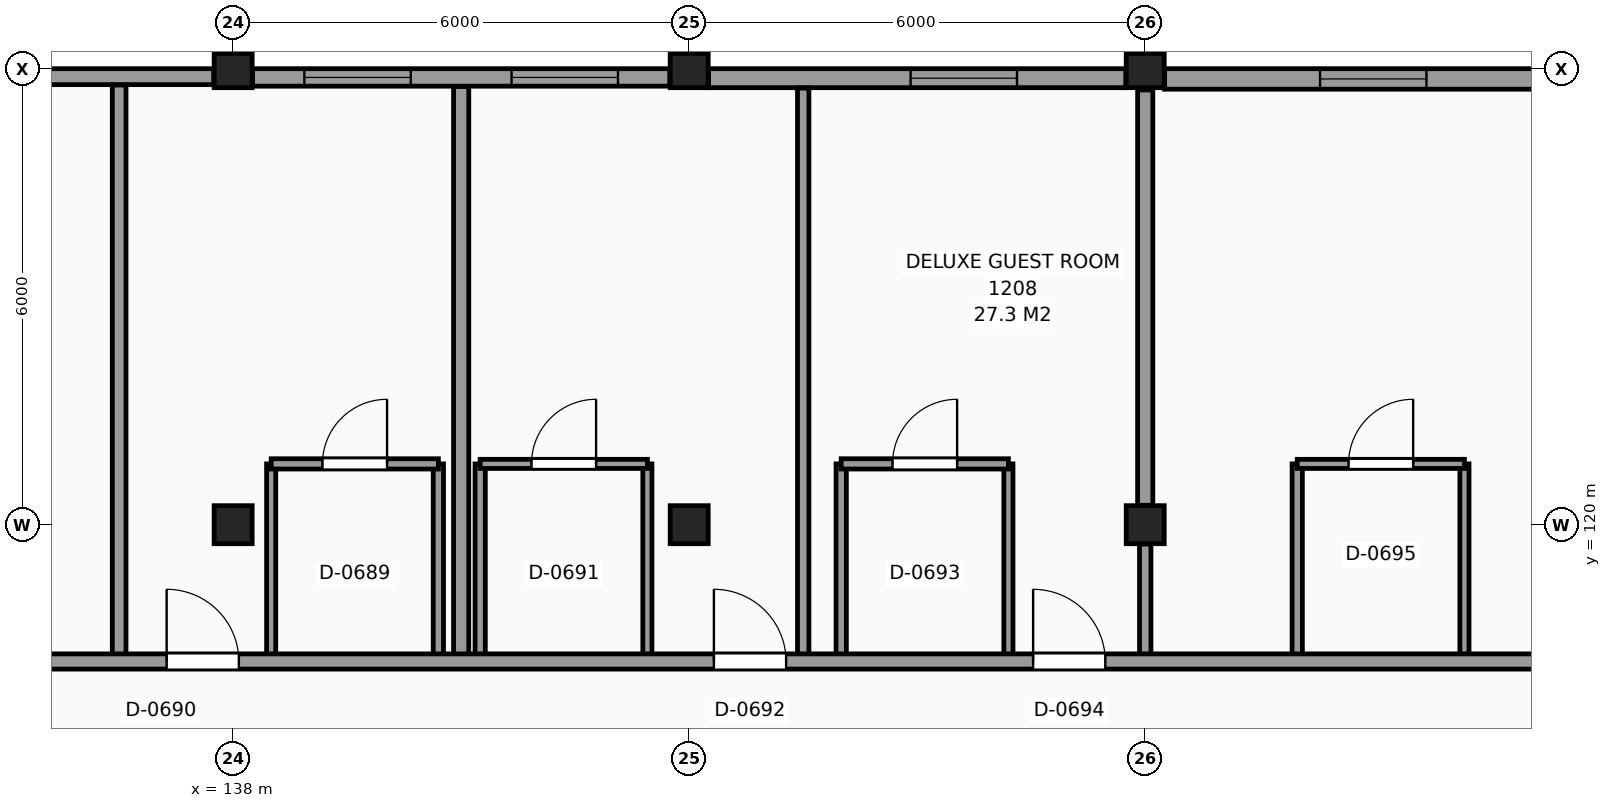
"""IFC4 building model, lengths in metres.
Left out: names, types, materials, properties, quantities, classifications, styles, units other than length and angle.
Written with IfcOpenShell. Run it as: python <this file> out.ifc"""

import sys

from ifc_helpers import new_model, si_unit, direction, frame, frame_2d, origin, origin_2d, place, context, subcontext, project, spatial, rectangle, extrude, element, fill, save


model = new_model("IFC4")
c1 = context("Model", 3, precision=1e-05, world=origin(), true_north=direction((0.0, 1.0)))
c2 = subcontext(c1, "Body", "Model", "MODEL_VIEW")
j1 = project(units=[si_unit("LENGTHUNIT", "METRE"), si_unit("PLANEANGLEUNIT", "RADIAN")], contexts=[c1])
p1 = place(None, origin())
s1 = spatial("IfcSite", under=j1, at=p1, CompositionType="ELEMENT")
p2 = place(p1, origin())
s2 = spatial("IfcBuilding", under=s1, at=p2, CompositionType="ELEMENT")
p3 = place(p2, frame((0.0, 0.0, 48.0)))
s3 = spatial("IfcBuildingStorey", under=s2, at=p3, CompositionType="ELEMENT", Elevation=48.0)
for number, where, z_axis, x_axis in (
    (1, (138.0, 120.0, 0.0), (0.0, 0.0, 1.0), (1.0, 0.0, 0.0)),
    (2, (138.0, 126.0, 0.0), (0.0, 0.0, 1.0), (1.0, 0.0, 0.0)),
    (3, (144.0, 120.0, 0.0), (0.0, 0.0, 1.0), (1.0, 0.0, 0.0)),
    (4, (144.0, 126.0, 0.0), (0.0, 0.0, 1.0), (1.0, 0.0, 0.0)),
    (5, (150.0, 120.0, 0.0), (0.0, 0.0, 1.0), (1.0, 0.0, 0.0)),
    (6, (150.0, 126.0, 0.0), (0.0, 0.0, 1.0), (1.0, 0.0, 0.0)),
):
    element("IfcColumn", number, at=place(p3, frame(where, z_axis=z_axis, x_axis=x_axis)), inside=s3, PredefinedType="COLUMN", context=c2, shape_type="SweptSolid", body=[
        extrude(rectangle(XDim=0.5, YDim=0.5, at=origin_2d()), origin(), (0.0, 0.0, 1.0), 3.3),
    ])
p4 = place(p3, frame((155.745, 125.865, 0.0), z_axis=(0.0, 0.0, 1.0), x_axis=(-1.0, 0.0, 0.0)))
e7 = element("IfcWall", 7, at=p4, inside=s3, PredefinedType="SOLIDWALL", context=c2, shape_type="SweptSolid", body=[
    extrude(rectangle(XDim=5.49, YDim=0.27, at=frame_2d((2.745, 0.0))), origin(), (0.0, 0.0, 1.0), 2.4),
])
p5 = place(p4, frame((2.045, 0.0, 0.8)))
e8 = element("IfcOpeningElement", 8, at=p5, cuts=e7, PredefinedType="OPENING", context=c2, shape_type="SweptSolid", body=[
    extrude(rectangle(XDim=1.4, YDim=1.4, at=frame_2d((0.7, 0.7))), frame((0.0, 0.145, 0.0), z_axis=(0.0, -1.0, 0.0), x_axis=(1.0, 0.0, 0.0)), (0.0, 0.0, 1.0), 0.29),
])
p6 = place(p3, frame((149.745, 125.875, 0.0), z_axis=(0.0, 0.0, 1.0), x_axis=(-1.0, 0.0, 0.0)))
e9 = element("IfcWall", 9, at=p6, inside=s3, PredefinedType="SOLIDWALL", context=c2, shape_type="SweptSolid", body=[
    extrude(rectangle(XDim=5.49, YDim=0.25, at=frame_2d((2.745, 0.0))), origin(), (0.0, 0.0, 1.0), 2.4),
])
p7 = place(p6, frame((1.432, 0.0, 0.8)))
e10 = element("IfcOpeningElement", 10, at=p7, cuts=e9, PredefinedType="OPENING", context=c2, shape_type="SweptSolid", body=[
    extrude(rectangle(XDim=1.4, YDim=1.4, at=frame_2d((0.7, 0.7))), frame((0.0, 0.135, 0.0), z_axis=(0.0, -1.0, 0.0), x_axis=(1.0, 0.0, 0.0)), (0.0, 0.0, 1.0), 0.27),
])
p8 = place(p3, frame((143.745, 125.885, 0.0), z_axis=(0.0, 0.0, 1.0), x_axis=(-1.0, 0.0, 0.0)))
e11 = element("IfcWall", 11, at=p8, inside=s3, PredefinedType="SOLIDWALL", context=c2, shape_type="SweptSolid", body=[
    extrude(rectangle(XDim=5.49, YDim=0.23, at=frame_2d((2.745, 0.0))), origin(), (0.0, 0.0, 1.0), 2.4),
])
p9 = place(p8, frame((3.408, 0.0, 0.8)))
e12 = element("IfcOpeningElement", 12, at=p9, cuts=e11, PredefinedType="OPENING", context=c2, shape_type="SweptSolid", body=[
    extrude(rectangle(XDim=1.4, YDim=1.4, at=frame_2d((0.7, 0.7))), frame((0.0, 0.125, 0.0), z_axis=(0.0, -1.0, 0.0), x_axis=(1.0, 0.0, 0.0)), (0.0, 0.0, 1.0), 0.25),
])
p10 = place(p8, frame((0.682, 0.0, 0.8)))
e13 = element("IfcOpeningElement", 13, at=p10, cuts=e11, PredefinedType="OPENING", context=c2, shape_type="SweptSolid", body=[
    extrude(rectangle(XDim=1.4, YDim=1.4, at=frame_2d((0.7, 0.7))), frame((0.0, 0.125, 0.0), z_axis=(0.0, -1.0, 0.0), x_axis=(1.0, 0.0, 0.0)), (0.0, 0.0, 1.0), 0.25),
])
p11 = place(p3, frame((137.745, 125.895, 0.0), z_axis=(0.0, 0.0, 1.0), x_axis=(-1.0, 0.0, 0.0)))
e14 = element("IfcWall", 14, at=p11, inside=s3, PredefinedType="SOLIDWALL", context=c2, shape_type="SweptSolid", body=[
    extrude(rectangle(XDim=5.49, YDim=0.21, at=frame_2d((2.745, 0.0))), origin(), (0.0, 0.0, 1.0), 2.4),
])
p12 = place(p3, frame((136.5, 118.2, 0.0), z_axis=(0.0, 0.0, 1.0), x_axis=(0.0, 1.0, 0.0)))
e15 = element("IfcWall", 15, at=p12, inside=s3, PredefinedType="PARTITIONING", context=c2, shape_type="SweptSolid", body=[
    extrude(rectangle(XDim=7.585, YDim=0.18, at=frame_2d((3.792, 0.0))), origin(), (0.0, 0.0, 1.0), 3.05),
])
p13 = place(p3, frame((138.5, 118.2, 0.0), z_axis=(0.0, 0.0, 1.0), x_axis=(0.0, 1.0, 0.0)))
e16 = element("IfcWall", 16, at=p13, inside=s3, PredefinedType="PARTITIONING", context=c2, shape_type="SweptSolid", body=[
    extrude(rectangle(XDim=2.6, YDim=0.12, at=frame_2d((1.3, 0.0))), origin(), (0.0, 0.0, 1.0), 3.05),
])
p14 = place(p3, frame((140.7, 118.2, 0.0), z_axis=(0.0, 0.0, 1.0), x_axis=(0.0, 1.0, 0.0)))
e17 = element("IfcWall", 17, at=p14, inside=s3, PredefinedType="PARTITIONING", context=c2, shape_type="SweptSolid", body=[
    extrude(rectangle(XDim=2.6, YDim=0.135, at=frame_2d((1.3, 0.0))), origin(), (0.0, 0.0, 1.0), 3.05),
])
p15 = place(p3, frame((141.0, 118.2, 0.0), z_axis=(0.0, 0.0, 1.0), x_axis=(0.0, 1.0, 0.0)))
e18 = element("IfcWall", 18, at=p15, inside=s3, PredefinedType="PARTITIONING", context=c2, shape_type="SweptSolid", body=[
    extrude(rectangle(XDim=7.565, YDim=0.2, at=frame_2d((3.782, 0.0))), origin(), (0.0, 0.0, 1.0), 3.05),
])
p16 = place(p3, frame((141.25, 118.2, 0.0), z_axis=(0.0, 0.0, 1.0), x_axis=(0.0, 1.0, 0.0)))
e19 = element("IfcWall", 19, at=p16, inside=s3, PredefinedType="PARTITIONING", context=c2, shape_type="SweptSolid", body=[
    extrude(rectangle(XDim=2.6, YDim=0.135, at=frame_2d((1.3, 0.0))), origin(), (0.0, 0.0, 1.0), 3.05),
])
p17 = place(p3, frame((143.45, 118.2, 0.0), z_axis=(0.0, 0.0, 1.0), x_axis=(0.0, 1.0, 0.0)))
e20 = element("IfcWall", 20, at=p17, inside=s3, PredefinedType="PARTITIONING", context=c2, shape_type="SweptSolid", body=[
    extrude(rectangle(XDim=2.6, YDim=0.12, at=frame_2d((1.3, 0.0))), origin(), (0.0, 0.0, 1.0), 3.05),
])
p18 = place(p3, frame((145.5, 118.2, 0.0), z_axis=(0.0, 0.0, 1.0), x_axis=(0.0, 1.0, 0.0)))
e21 = element("IfcWall", 21, at=p18, inside=s3, PredefinedType="PARTITIONING", context=c2, shape_type="SweptSolid", body=[
    extrude(rectangle(XDim=7.545, YDim=0.15, at=frame_2d((3.772, 0.0))), origin(), (0.0, 0.0, 1.0), 3.05),
])
p19 = place(p3, frame((146.0, 118.2, 0.0), z_axis=(0.0, 0.0, 1.0), x_axis=(0.0, 1.0, 0.0)))
e22 = element("IfcWall", 22, at=p19, inside=s3, PredefinedType="PARTITIONING", context=c2, shape_type="SweptSolid", body=[
    extrude(rectangle(XDim=2.6, YDim=0.135, at=frame_2d((1.3, 0.0))), origin(), (0.0, 0.0, 1.0), 3.05),
])
p20 = place(p3, frame((148.2, 118.2, 0.0), z_axis=(0.0, 0.0, 1.0), x_axis=(0.0, 1.0, 0.0)))
e23 = element("IfcWall", 23, at=p20, inside=s3, PredefinedType="PARTITIONING", context=c2, shape_type="SweptSolid", body=[
    extrude(rectangle(XDim=2.6, YDim=0.12, at=frame_2d((1.3, 0.0))), origin(), (0.0, 0.0, 1.0), 3.05),
])
p21 = place(p3, frame((150.0, 118.2, 0.0), z_axis=(0.0, 0.0, 1.0), x_axis=(0.0, 1.0, 0.0)))
e24 = element("IfcWall", 24, at=p21, inside=s3, PredefinedType="PARTITIONING", context=c2, shape_type="SweptSolid", body=[
    extrude(rectangle(XDim=1.545, YDim=0.15, at=frame_2d((0.772, 0.0))), origin(), (0.0, 0.0, 1.0), 2.5),
])
p22 = place(p3, frame((150.0, 120.255, 0.0), z_axis=(0.0, 0.0, 1.0), x_axis=(0.0, 1.0, 0.0)))
e25 = element("IfcWall", 25, at=p22, inside=s3, PredefinedType="PARTITIONING", context=c2, shape_type="SweptSolid", body=[
    extrude(rectangle(XDim=5.465, YDim=0.2, at=frame_2d((2.732, 0.0))), origin(), (0.0, 0.0, 1.0), 2.55),
])
p23 = place(p3, frame((152.0, 118.2, 0.0), z_axis=(0.0, 0.0, 1.0), x_axis=(0.0, 1.0, 0.0)))
e26 = element("IfcWall", 26, at=p23, inside=s3, PredefinedType="PARTITIONING", context=c2, shape_type="SweptSolid", body=[
    extrude(rectangle(XDim=2.6, YDim=0.135, at=frame_2d((1.3, 0.0))), origin(), (0.0, 0.0, 1.0), 3.05),
])
p24 = place(p3, frame((154.2, 118.2, 0.0), z_axis=(0.0, 0.0, 1.0), x_axis=(0.0, 1.0, 0.0)))
e27 = element("IfcWall", 27, at=p24, inside=s3, PredefinedType="PARTITIONING", context=c2, shape_type="SweptSolid", body=[
    extrude(rectangle(XDim=2.6, YDim=0.12, at=frame_2d((1.3, 0.0))), origin(), (0.0, 0.0, 1.0), 3.05),
])
p25 = place(p3, frame((102.235, 118.2, 0.0), z_axis=(0.0, 0.0, 1.0), x_axis=(1.0, 0.0, 0.0)))
e28 = element("IfcWall", 28, at=p25, inside=s3, PredefinedType="PARTITIONING", context=c2, shape_type="SweptSolid", body=[
    extrude(rectangle(XDim=74.265, YDim=0.2, at=frame_2d((37.132, 0.0))), origin(), (0.0, 0.0, 1.0), 3.05),
])
p26 = place(p25, frame((0.49, 0.0, 0.0)))
e29 = element("IfcOpeningElement", 29, at=p26, cuts=e28, PredefinedType="OPENING", context=c2, shape_type="SweptSolid", body=[
    extrude(rectangle(XDim=0.95, YDim=2.1, at=frame_2d((0.475, 1.05))), frame((0.0, 0.11, 0.0), z_axis=(0.0, -1.0, 0.0), x_axis=(1.0, 0.0, 0.0)), (0.0, 0.0, 1.0), 0.22),
])
p27 = place(p25, frame((4.89, 0.0, 0.0)))
e30 = element("IfcOpeningElement", 30, at=p27, cuts=e28, PredefinedType="OPENING", context=c2, shape_type="SweptSolid", body=[
    extrude(rectangle(XDim=0.95, YDim=2.1, at=frame_2d((0.475, 1.05))), frame((0.0, 0.11, 0.0), z_axis=(0.0, -1.0, 0.0), x_axis=(1.0, 0.0, 0.0)), (0.0, 0.0, 1.0), 0.22),
])
p28 = place(p25, frame((12.09, 0.0, 0.0)))
e31 = element("IfcOpeningElement", 31, at=p28, cuts=e28, PredefinedType="OPENING", context=c2, shape_type="SweptSolid", body=[
    extrude(rectangle(XDim=0.95, YDim=2.1, at=frame_2d((0.475, 1.05))), frame((0.0, 0.11, 0.0), z_axis=(0.0, -1.0, 0.0), x_axis=(1.0, 0.0, 0.0)), (0.0, 0.0, 1.0), 0.22),
])
p29 = place(p25, frame((20.34, 0.0, 0.0)))
e32 = element("IfcOpeningElement", 32, at=p29, cuts=e28, PredefinedType="OPENING", context=c2, shape_type="SweptSolid", body=[
    extrude(rectangle(XDim=0.95, YDim=2.1, at=frame_2d((0.475, 1.05))), frame((0.0, 0.11, 0.0), z_axis=(0.0, -1.0, 0.0), x_axis=(1.0, 0.0, 0.0)), (0.0, 0.0, 1.0), 0.22),
])
p30 = place(p25, frame((32.34, 0.0, 0.0)))
e33 = element("IfcOpeningElement", 33, at=p30, cuts=e28, PredefinedType="OPENING", context=c2, shape_type="SweptSolid", body=[
    extrude(rectangle(XDim=0.95, YDim=2.1, at=frame_2d((0.475, 1.05))), frame((0.0, 0.11, 0.0), z_axis=(0.0, -1.0, 0.0), x_axis=(1.0, 0.0, 0.0)), (0.0, 0.0, 1.0), 0.22),
])
p31 = place(p25, frame((34.89, 0.0, 0.0)))
e34 = element("IfcOpeningElement", 34, at=p31, cuts=e28, PredefinedType="OPENING", context=c2, shape_type="SweptSolid", body=[
    extrude(rectangle(XDim=0.95, YDim=2.1, at=frame_2d((0.475, 1.05))), frame((0.0, 0.11, 0.0), z_axis=(0.0, -1.0, 0.0), x_axis=(1.0, 0.0, 0.0)), (0.0, 0.0, 1.0), 0.22),
])
p32 = place(p25, frame((42.09, 0.0, 0.0)))
e35 = element("IfcOpeningElement", 35, at=p32, cuts=e28, PredefinedType="OPENING", context=c2, shape_type="SweptSolid", body=[
    extrude(rectangle(XDim=0.95, YDim=2.1, at=frame_2d((0.475, 1.05))), frame((0.0, 0.11, 0.0), z_axis=(0.0, -1.0, 0.0), x_axis=(1.0, 0.0, 0.0)), (0.0, 0.0, 1.0), 0.22),
])
p33 = place(p25, frame((46.29, 0.0, 0.0)))
e36 = element("IfcOpeningElement", 36, at=p33, cuts=e28, PredefinedType="OPENING", context=c2, shape_type="SweptSolid", body=[
    extrude(rectangle(XDim=0.95, YDim=2.1, at=frame_2d((0.475, 1.05))), frame((0.0, 0.11, 0.0), z_axis=(0.0, -1.0, 0.0), x_axis=(1.0, 0.0, 0.0)), (0.0, 0.0, 1.0), 0.22),
])
p34 = place(p25, frame((55.59, 0.0, 0.0)))
e37 = element("IfcOpeningElement", 37, at=p34, cuts=e28, PredefinedType="OPENING", context=c2, shape_type="SweptSolid", body=[
    extrude(rectangle(XDim=0.95, YDim=2.1, at=frame_2d((0.475, 1.05))), frame((0.0, 0.11, 0.0), z_axis=(0.0, -1.0, 0.0), x_axis=(1.0, 0.0, 0.0)), (0.0, 0.0, 1.0), 0.22),
])
p35 = place(p25, frame((60.09, 0.0, 0.0)))
e38 = element("IfcOpeningElement", 38, at=p35, cuts=e28, PredefinedType="OPENING", context=c2, shape_type="SweptSolid", body=[
    extrude(rectangle(XDim=0.95, YDim=2.1, at=frame_2d((0.475, 1.05))), frame((0.0, 0.11, 0.0), z_axis=(0.0, -1.0, 0.0), x_axis=(1.0, 0.0, 0.0)), (0.0, 0.0, 1.0), 0.22),
])
p36 = place(p25, frame((64.29, 0.0, 0.0)))
e39 = element("IfcOpeningElement", 39, at=p36, cuts=e28, PredefinedType="OPENING", context=c2, shape_type="SweptSolid", body=[
    extrude(rectangle(XDim=0.95, YDim=2.1, at=frame_2d((0.475, 1.05))), frame((0.0, 0.11, 0.0), z_axis=(0.0, -1.0, 0.0), x_axis=(1.0, 0.0, 0.0)), (0.0, 0.0, 1.0), 0.22),
])
p37 = place(p25, frame((68.24, 0.0, 0.0)))
e40 = element("IfcOpeningElement", 40, at=p37, cuts=e28, PredefinedType="OPENING", context=c2, shape_type="SweptSolid", body=[
    extrude(rectangle(XDim=0.95, YDim=2.1, at=frame_2d((0.475, 1.05))), frame((0.0, 0.11, 0.0), z_axis=(0.0, -1.0, 0.0), x_axis=(1.0, 0.0, 0.0)), (0.0, 0.0, 1.0), 0.22),
])
p38 = place(p3, frame((138.5, 120.8, 0.0), z_axis=(0.0, 0.0, 1.0), x_axis=(1.0, 0.0, 0.0)))
e41 = element("IfcWall", 41, at=p38, inside=s3, PredefinedType="PARTITIONING", context=c2, shape_type="SweptSolid", body=[
    extrude(rectangle(XDim=2.2, YDim=0.135, at=frame_2d((1.1, 0.0))), origin(), (0.0, 0.0, 1.0), 3.05),
])
p39 = place(p38, frame((0.675, 0.0, 0.0)))
e42 = element("IfcOpeningElement", 42, at=p39, cuts=e41, PredefinedType="OPENING", context=c2, shape_type="SweptSolid", body=[
    extrude(rectangle(XDim=0.85, YDim=2.1, at=frame_2d((0.425, 1.05))), frame((0.0, 0.078, 0.0), z_axis=(0.0, -1.0, 0.0), x_axis=(1.0, 0.0, 0.0)), (0.0, 0.0, 1.0), 0.155),
])
p40 = place(p3, frame((141.25, 120.8, 0.0), z_axis=(0.0, 0.0, 1.0), x_axis=(1.0, 0.0, 0.0)))
e43 = element("IfcWall", 43, at=p40, inside=s3, PredefinedType="PARTITIONING", context=c2, shape_type="SweptSolid", body=[
    extrude(rectangle(XDim=2.2, YDim=0.12, at=frame_2d((1.1, 0.0))), origin(), (0.0, 0.0, 1.0), 3.05),
])
p41 = place(p40, frame((0.675, 0.0, 0.0)))
e44 = element("IfcOpeningElement", 44, at=p41, cuts=e43, PredefinedType="OPENING", context=c2, shape_type="SweptSolid", body=[
    extrude(rectangle(XDim=0.85, YDim=2.1, at=frame_2d((0.425, 1.05))), frame((0.0, 0.07, 0.0), z_axis=(0.0, -1.0, 0.0), x_axis=(1.0, 0.0, 0.0)), (0.0, 0.0, 1.0), 0.14),
])
p42 = place(p3, frame((146.0, 120.8, 0.0), z_axis=(0.0, 0.0, 1.0), x_axis=(1.0, 0.0, 0.0)))
e45 = element("IfcWall", 45, at=p42, inside=s3, PredefinedType="PARTITIONING", context=c2, shape_type="SweptSolid", body=[
    extrude(rectangle(XDim=2.2, YDim=0.135, at=frame_2d((1.1, 0.0))), origin(), (0.0, 0.0, 1.0), 3.05),
])
p43 = place(p42, frame((0.675, 0.0, 0.0)))
e46 = element("IfcOpeningElement", 46, at=p43, cuts=e45, PredefinedType="OPENING", context=c2, shape_type="SweptSolid", body=[
    extrude(rectangle(XDim=0.85, YDim=2.1, at=frame_2d((0.425, 1.05))), frame((0.0, 0.078, 0.0), z_axis=(0.0, -1.0, 0.0), x_axis=(1.0, 0.0, 0.0)), (0.0, 0.0, 1.0), 0.155),
])
p44 = place(p3, frame((152.0, 120.8, 0.0), z_axis=(0.0, 0.0, 1.0), x_axis=(1.0, 0.0, 0.0)))
e47 = element("IfcWall", 47, at=p44, inside=s3, PredefinedType="PARTITIONING", context=c2, shape_type="SweptSolid", body=[
    extrude(rectangle(XDim=2.2, YDim=0.12, at=frame_2d((1.1, 0.0))), origin(), (0.0, 0.0, 1.0), 3.05),
])
p45 = place(p44, frame((0.675, 0.0, 0.0)))
e48 = element("IfcOpeningElement", 48, at=p45, cuts=e47, PredefinedType="OPENING", context=c2, shape_type="SweptSolid", body=[
    extrude(rectangle(XDim=0.85, YDim=2.1, at=frame_2d((0.425, 1.05))), frame((0.0, 0.07, 0.0), z_axis=(0.0, -1.0, 0.0), x_axis=(1.0, 0.0, 0.0)), (0.0, 0.0, 1.0), 0.14),
])
p46 = place(p9, origin())
e49 = element("IfcWindow", 49, at=p46, inside=s3, PartitioningType="SINGLE_PANEL", PredefinedType="WINDOW", context=c2, shape_type="SweptSolid", body=[
    extrude(rectangle(XDim=1.4, YDim=1.4, at=frame_2d((0.7, 0.7))), frame((0.0, 0.03, 0.0), z_axis=(0.0, -1.0, 0.0), x_axis=(1.0, 0.0, 0.0)), (0.0, 0.0, 1.0), 0.06),
])
fill(e12, e49)
p47 = place(p10, origin())
e50 = element("IfcWindow", 50, at=p47, inside=s3, PartitioningType="SINGLE_PANEL", PredefinedType="WINDOW", context=c2, shape_type="SweptSolid", body=[
    extrude(rectangle(XDim=1.4, YDim=1.4, at=frame_2d((0.7, 0.7))), frame((0.0, 0.03, 0.0), z_axis=(0.0, -1.0, 0.0), x_axis=(1.0, 0.0, 0.0)), (0.0, 0.0, 1.0), 0.06),
])
fill(e13, e50)
p48 = place(p7, origin())
e51 = element("IfcWindow", 51, at=p48, inside=s3, PartitioningType="SINGLE_PANEL", PredefinedType="WINDOW", context=c2, shape_type="SweptSolid", body=[
    extrude(rectangle(XDim=1.4, YDim=1.4, at=frame_2d((0.7, 0.7))), frame((0.0, 0.03, 0.0), z_axis=(0.0, -1.0, 0.0), x_axis=(1.0, 0.0, 0.0)), (0.0, 0.0, 1.0), 0.06),
])
fill(e10, e51)
p49 = place(p5, origin())
e52 = element("IfcWindow", 52, at=p49, inside=s3, PartitioningType="SINGLE_PANEL", PredefinedType="WINDOW", context=c2, shape_type="SweptSolid", body=[
    extrude(rectangle(XDim=1.4, YDim=1.4, at=frame_2d((0.7, 0.7))), frame((0.0, 0.03, 0.0), z_axis=(0.0, -1.0, 0.0), x_axis=(1.0, 0.0, 0.0)), (0.0, 0.0, 1.0), 0.06),
])
fill(e8, e52)
p50 = place(p39, origin())
e53 = element("IfcDoor", 53, at=p50, inside=s3, OperationType="SINGLE_SWING_RIGHT", PredefinedType="DOOR", context=c2, shape_type="SweptSolid", body=[
    extrude(rectangle(XDim=0.85, YDim=2.1, at=frame_2d((0.425, 1.05))), frame((0.0, 0.025, 0.0), z_axis=(0.0, -1.0, 0.0), x_axis=(1.0, 0.0, 0.0)), (0.0, 0.0, 1.0), 0.05),
])
fill(e42, e53)
p51 = place(p31, origin())
e54 = element("IfcDoor", 54, at=p51, inside=s3, OperationType="SINGLE_SWING_LEFT", PredefinedType="DOOR", context=c2, shape_type="SweptSolid", body=[
    extrude(rectangle(XDim=0.95, YDim=2.1, at=frame_2d((0.475, 1.05))), frame((0.0, 0.025, 0.0), z_axis=(0.0, -1.0, 0.0), x_axis=(1.0, 0.0, 0.0)), (0.0, 0.0, 1.0), 0.05),
])
fill(e34, e54)
p52 = place(p41, origin())
e55 = element("IfcDoor", 55, at=p52, inside=s3, OperationType="SINGLE_SWING_RIGHT", PredefinedType="DOOR", context=c2, shape_type="SweptSolid", body=[
    extrude(rectangle(XDim=0.85, YDim=2.1, at=frame_2d((0.425, 1.05))), frame((0.0, 0.025, 0.0), z_axis=(0.0, -1.0, 0.0), x_axis=(1.0, 0.0, 0.0)), (0.0, 0.0, 1.0), 0.05),
])
fill(e44, e55)
p53 = place(p32, origin())
e56 = element("IfcDoor", 56, at=p53, inside=s3, OperationType="SINGLE_SWING_LEFT", PredefinedType="DOOR", context=c2, shape_type="SweptSolid", body=[
    extrude(rectangle(XDim=0.95, YDim=2.1, at=frame_2d((0.475, 1.05))), frame((0.0, 0.025, 0.0), z_axis=(0.0, -1.0, 0.0), x_axis=(1.0, 0.0, 0.0)), (0.0, 0.0, 1.0), 0.05),
])
fill(e35, e56)
p54 = place(p43, origin())
e57 = element("IfcDoor", 57, at=p54, inside=s3, OperationType="SINGLE_SWING_RIGHT", PredefinedType="DOOR", context=c2, shape_type="SweptSolid", body=[
    extrude(rectangle(XDim=0.85, YDim=2.1, at=frame_2d((0.425, 1.05))), frame((0.0, 0.025, 0.0), z_axis=(0.0, -1.0, 0.0), x_axis=(1.0, 0.0, 0.0)), (0.0, 0.0, 1.0), 0.05),
])
fill(e46, e57)
p55 = place(p33, origin())
e58 = element("IfcDoor", 58, at=p55, inside=s3, OperationType="SINGLE_SWING_LEFT", PredefinedType="DOOR", context=c2, shape_type="SweptSolid", body=[
    extrude(rectangle(XDim=0.95, YDim=2.1, at=frame_2d((0.475, 1.05))), frame((0.0, 0.025, 0.0), z_axis=(0.0, -1.0, 0.0), x_axis=(1.0, 0.0, 0.0)), (0.0, 0.0, 1.0), 0.05),
])
fill(e36, e58)
p56 = place(p45, origin())
e59 = element("IfcDoor", 59, at=p56, inside=s3, OperationType="SINGLE_SWING_RIGHT", PredefinedType="DOOR", context=c2, shape_type="SweptSolid", body=[
    extrude(rectangle(XDim=0.85, YDim=2.1, at=frame_2d((0.425, 1.05))), frame((0.0, 0.025, 0.0), z_axis=(0.0, -1.0, 0.0), x_axis=(1.0, 0.0, 0.0)), (0.0, 0.0, 1.0), 0.05),
])
fill(e48, e59)
save(model, sys.argv[1])
